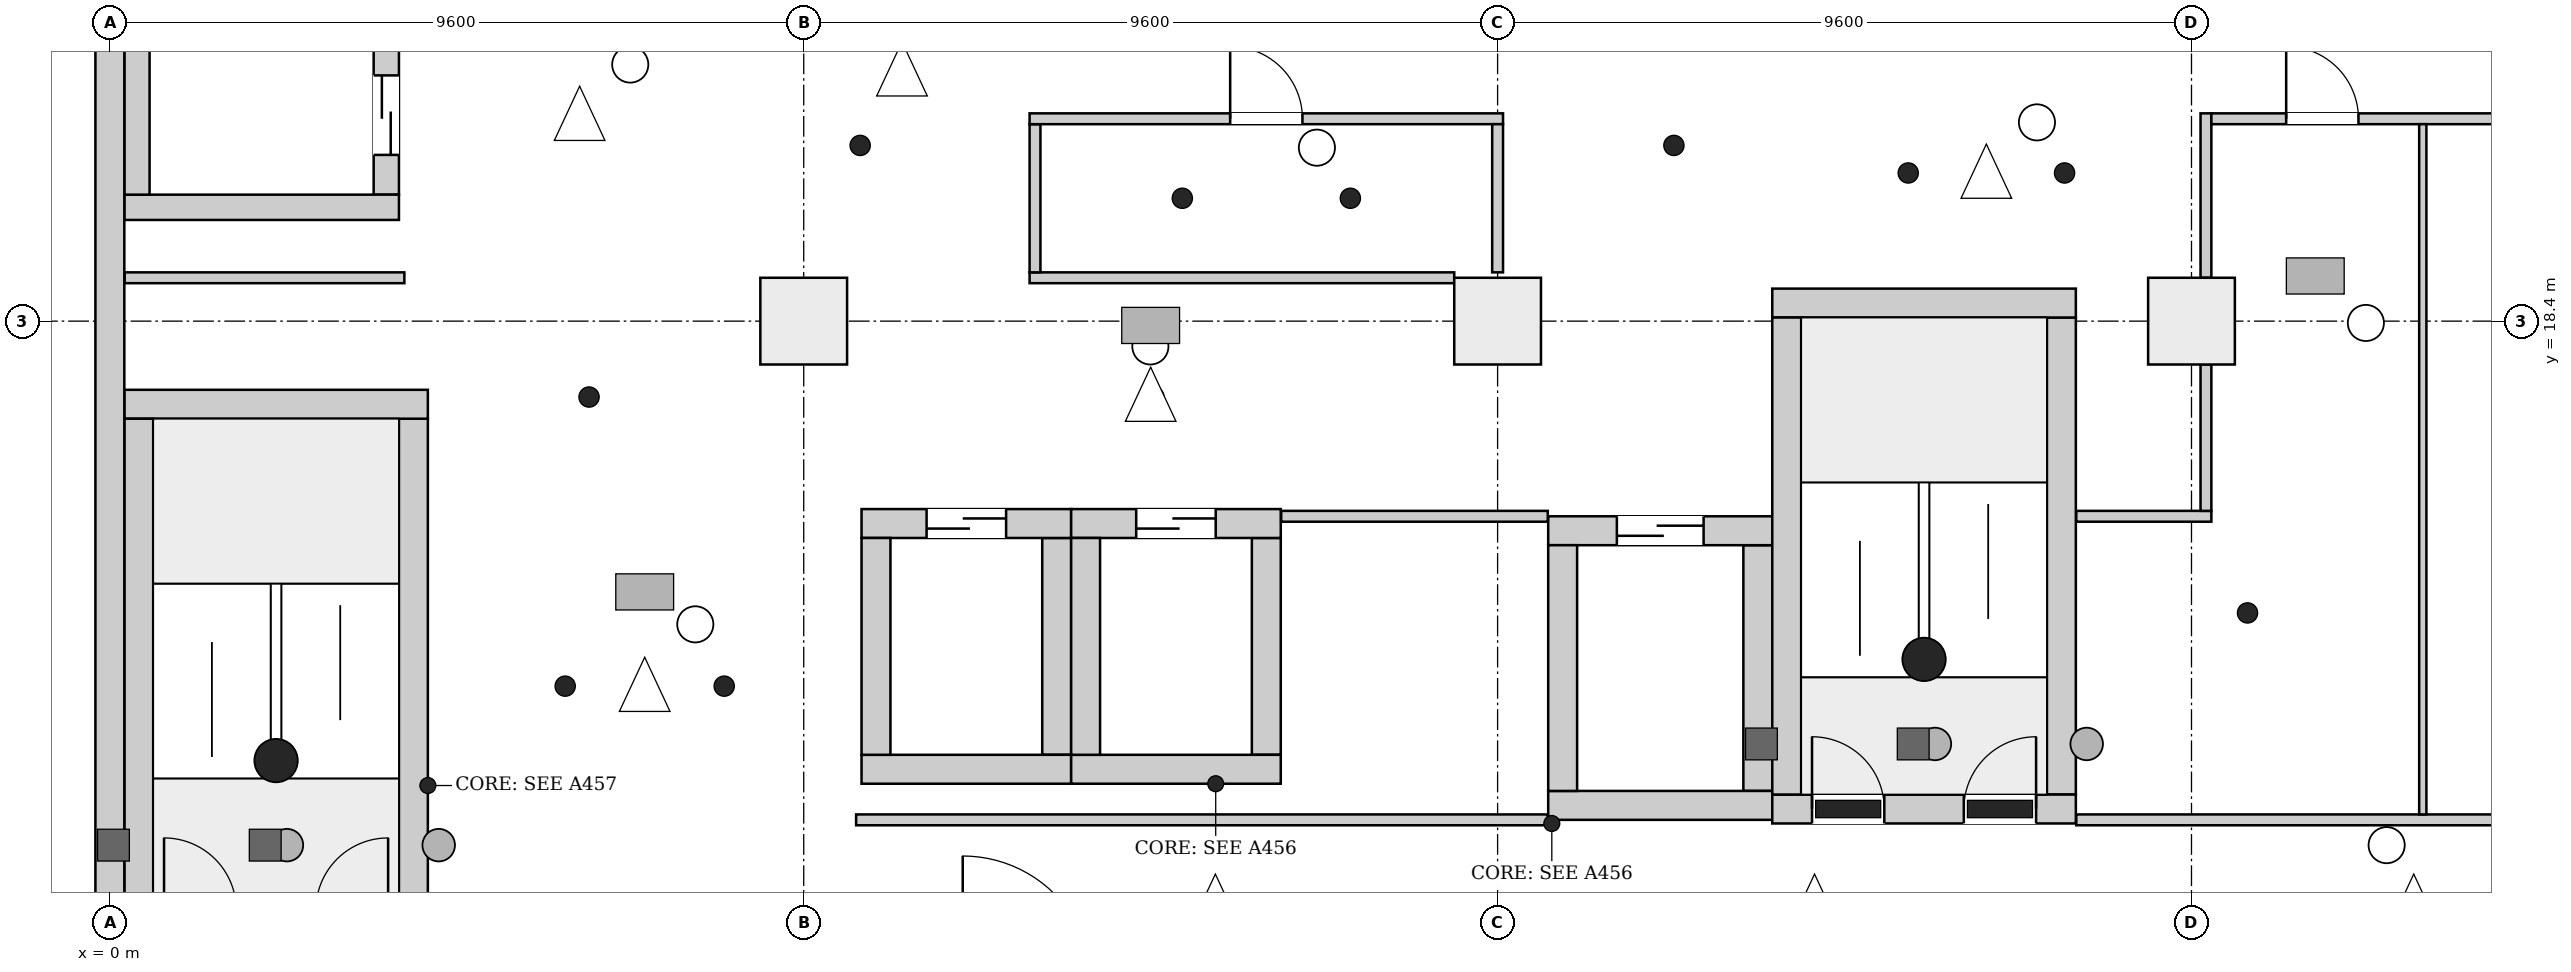
"""IFC4 building model, lengths in metres.
Left out: names, types, materials, properties, quantities, classifications, styles, units other than length and angle.
Written with IfcOpenShell. Run it as: python <this file> out.ifc"""

import sys

from ifc_helpers import new_model, si_unit, direction, frame, frame_2d, origin, origin_2d, place, context, subcontext, project, spatial, rectangle, extrude, element, fill, save


model = new_model("IFC4")
c1 = context("Model", 3, precision=1e-05, world=origin(), true_north=direction((0.0, 1.0)))
c2 = subcontext(c1, "Body", "Model", "MODEL_VIEW")
j1 = project(units=[si_unit("LENGTHUNIT", "METRE"), si_unit("PLANEANGLEUNIT", "RADIAN")], contexts=[c1])
p1 = place(None, origin())
s1 = spatial("IfcSite", under=j1, at=p1, CompositionType="ELEMENT")
p2 = place(p1, origin())
s2 = spatial("IfcBuilding", under=s1, at=p2, CompositionType="ELEMENT")
p3 = place(p2, frame((0.0, 0.0, 21.7)))
s3 = spatial("IfcBuildingStorey", under=s2, at=p3, CompositionType="ELEMENT", Elevation=21.7)
p4 = place(p3, frame((0.0, -0.2, 0.0), z_axis=(0.0, 0.0, 1.0), x_axis=(0.0, 1.0, 0.0)))
e1 = element("IfcWall", 1, at=p4, inside=s3, PredefinedType="SHEAR", context=c2, shape_type="SweptSolid", body=[
    extrude(rectangle(XDim=46.88, YDim=0.4, at=frame_2d((23.44, 0.0))), origin(), (0.0, 0.0, 1.0), 5.0),
])
p5 = place(p3, frame((0.2, 17.25, 0.0), z_axis=(0.0, 0.0, 1.0), x_axis=(1.0, 0.0, 0.0)))
e2 = element("IfcWall", 2, at=p5, inside=s3, PredefinedType="SHEAR", context=c2, shape_type="SweptSolid", body=[
    extrude(rectangle(XDim=4.2, YDim=0.4, at=frame_2d((2.1, 0.0))), origin(), (0.0, 0.0, 1.0), 5.0),
])
for number, where, z_axis, x_axis in (
    (3, (0.4, 10.45, 0.0), (0.0, 0.0, 1.0), (0.0, 1.0, 0.0)),
    (4, (4.2, 10.45, 0.0), (0.0, 0.0, 1.0), (0.0, 1.0, 0.0)),
):
    element("IfcWall", number, at=place(p3, frame(where, z_axis=z_axis, x_axis=x_axis)), inside=s3, PredefinedType="SHEAR", context=c2, shape_type="SweptSolid", body=[
        extrude(rectangle(XDim=6.6, YDim=0.4, at=frame_2d((3.3, 0.0))), origin(), (0.0, 0.0, 1.0), 5.0),
    ])
p6 = place(p3, frame((23.0, 11.65, 0.0), z_axis=(0.0, 0.0, 1.0), x_axis=(1.0, 0.0, 0.0)))
e5 = element("IfcWall", 5, at=p6, inside=s3, PredefinedType="SHEAR", context=c2, shape_type="SweptSolid", body=[
    extrude(rectangle(XDim=4.2, YDim=0.4, at=frame_2d((2.1, 0.0))), origin(), (0.0, 0.0, 1.0), 5.0),
])
p7 = place(p6, frame((0.55, 0.0, 0.0)))
e6 = element("IfcOpeningElement", 6, at=p7, cuts=e5, PredefinedType="OPENING", context=c2, shape_type="SweptSolid", body=[
    extrude(rectangle(XDim=1.0, YDim=2.1, at=frame_2d((0.5, 1.05))), frame((0.0, 0.21, 0.0), z_axis=(0.0, -1.0, 0.0), x_axis=(1.0, 0.0, 0.0)), (0.0, 0.0, 1.0), 0.42),
])
p8 = place(p6, frame((2.65, 0.0, 0.0)))
e7 = element("IfcOpeningElement", 7, at=p8, cuts=e5, PredefinedType="OPENING", context=c2, shape_type="SweptSolid", body=[
    extrude(rectangle(XDim=1.0, YDim=2.1, at=frame_2d((0.5, 1.05))), frame((0.0, 0.21, 0.0), z_axis=(0.0, -1.0, 0.0), x_axis=(1.0, 0.0, 0.0)), (0.0, 0.0, 1.0), 0.42),
])
p9 = place(p3, frame((23.0, 18.65, 0.0), z_axis=(0.0, 0.0, 1.0), x_axis=(1.0, 0.0, 0.0)))
e8 = element("IfcWall", 8, at=p9, inside=s3, PredefinedType="SHEAR", context=c2, shape_type="SweptSolid", body=[
    extrude(rectangle(XDim=4.2, YDim=0.4, at=frame_2d((2.1, 0.0))), origin(), (0.0, 0.0, 1.0), 5.0),
])
for number, where, z_axis, x_axis in (
    (9, (23.2, 11.85, 0.0), (0.0, 0.0, 1.0), (0.0, 1.0, 0.0)),
    (10, (27.0, 11.85, 0.0), (0.0, 0.0, 1.0), (0.0, 1.0, 0.0)),
):
    element("IfcWall", number, at=place(p3, frame(where, z_axis=z_axis, x_axis=x_axis)), inside=s3, PredefinedType="SHEAR", context=c2, shape_type="SweptSolid", body=[
        extrude(rectangle(XDim=6.6, YDim=0.4, at=frame_2d((3.3, 0.0))), origin(), (0.0, 0.0, 1.0), 5.0),
    ])
p10 = place(p3, frame((0.2, 19.975, 0.0), z_axis=(0.0, 0.0, 1.0), x_axis=(1.0, 0.0, 0.0)))
e11 = element("IfcWall", 11, at=p10, inside=s3, PredefinedType="SHEAR", context=c2, shape_type="SweptSolid", body=[
    extrude(rectangle(XDim=3.8, YDim=0.35, at=frame_2d((1.9, 0.0))), origin(), (0.0, 0.0, 1.0), 5.0),
])
p11 = place(p3, frame((0.375, 20.15, 0.0), z_axis=(0.0, 0.0, 1.0), x_axis=(0.0, 1.0, 0.0)))
e12 = element("IfcWall", 12, at=p11, inside=s3, PredefinedType="SHEAR", context=c2, shape_type="SweptSolid", body=[
    extrude(rectangle(XDim=2.2, YDim=0.35, at=frame_2d((1.1, 0.0))), origin(), (0.0, 0.0, 1.0), 5.0),
])
p12 = place(p3, frame((3.825, 20.15, 0.0), z_axis=(0.0, 0.0, 1.0), x_axis=(0.0, 1.0, 0.0)))
e13 = element("IfcWall", 13, at=p12, inside=s3, PredefinedType="SHEAR", context=c2, shape_type="SweptSolid", body=[
    extrude(rectangle(XDim=2.2, YDim=0.35, at=frame_2d((1.1, 0.0))), origin(), (0.0, 0.0, 1.0), 5.0),
])
p13 = place(p12, frame((0.55, 0.0, 0.0)))
e14 = element("IfcOpeningElement", 14, at=p13, cuts=e13, PredefinedType="OPENING", context=c2, shape_type="SweptSolid", body=[
    extrude(rectangle(XDim=1.1, YDim=2.1, at=frame_2d((0.55, 1.05))), frame((0.0, 0.185, 0.0), z_axis=(0.0, -1.0, 0.0), x_axis=(1.0, 0.0, 0.0)), (0.0, 0.0, 1.0), 0.37),
])
p14 = place(p3, frame((10.4, 12.2, 0.0), z_axis=(0.0, 0.0, 1.0), x_axis=(1.0, 0.0, 0.0)))
e15 = element("IfcWall", 15, at=p14, inside=s3, PredefinedType="SHEAR", context=c2, shape_type="SweptSolid", body=[
    extrude(rectangle(XDim=2.9, YDim=0.4, at=frame_2d((1.45, 0.0))), origin(), (0.0, 0.0, 1.0), 5.0),
])
p15 = place(p3, frame((10.4, 15.6, 0.0), z_axis=(0.0, 0.0, 1.0), x_axis=(1.0, 0.0, 0.0)))
e16 = element("IfcWall", 16, at=p15, inside=s3, PredefinedType="SHEAR", context=c2, shape_type="SweptSolid", body=[
    extrude(rectangle(XDim=2.9, YDim=0.4, at=frame_2d((1.45, 0.0))), origin(), (0.0, 0.0, 1.0), 5.0),
])
p16 = place(p15, frame((0.9, 0.0, 0.0)))
e17 = element("IfcOpeningElement", 17, at=p16, cuts=e16, PredefinedType="OPENING", context=c2, shape_type="SweptSolid", body=[
    extrude(rectangle(XDim=1.1, YDim=2.1, at=frame_2d((0.55, 1.05))), frame((0.0, 0.21, 0.0), z_axis=(0.0, -1.0, 0.0), x_axis=(1.0, 0.0, 0.0)), (0.0, 0.0, 1.0), 0.42),
])
for number, where, z_axis, x_axis in (
    (18, (10.6, 12.4, 0.0), (0.0, 0.0, 1.0), (0.0, 1.0, 0.0)),
    (19, (13.1, 12.4, 0.0), (0.0, 0.0, 1.0), (0.0, 1.0, 0.0)),
):
    element("IfcWall", number, at=place(p3, frame(where, z_axis=z_axis, x_axis=x_axis)), inside=s3, PredefinedType="SHEAR", context=c2, shape_type="SweptSolid", body=[
        extrude(rectangle(XDim=3.0, YDim=0.4, at=frame_2d((1.5, 0.0))), origin(), (0.0, 0.0, 1.0), 5.0),
    ])
p17 = place(p3, frame((13.3, 12.2, 0.0), z_axis=(0.0, 0.0, 1.0), x_axis=(1.0, 0.0, 0.0)))
e20 = element("IfcWall", 20, at=p17, inside=s3, PredefinedType="SHEAR", context=c2, shape_type="SweptSolid", body=[
    extrude(rectangle(XDim=2.9, YDim=0.4, at=frame_2d((1.45, 0.0))), origin(), (0.0, 0.0, 1.0), 5.0),
])
p18 = place(p3, frame((13.3, 15.6, 0.0), z_axis=(0.0, 0.0, 1.0), x_axis=(1.0, 0.0, 0.0)))
e21 = element("IfcWall", 21, at=p18, inside=s3, PredefinedType="SHEAR", context=c2, shape_type="SweptSolid", body=[
    extrude(rectangle(XDim=2.9, YDim=0.4, at=frame_2d((1.45, 0.0))), origin(), (0.0, 0.0, 1.0), 5.0),
])
p19 = place(p18, frame((0.9, 0.0, 0.0)))
e22 = element("IfcOpeningElement", 22, at=p19, cuts=e21, PredefinedType="OPENING", context=c2, shape_type="SweptSolid", body=[
    extrude(rectangle(XDim=1.1, YDim=2.1, at=frame_2d((0.55, 1.05))), frame((0.0, 0.21, 0.0), z_axis=(0.0, -1.0, 0.0), x_axis=(1.0, 0.0, 0.0)), (0.0, 0.0, 1.0), 0.42),
])
for number, where, z_axis, x_axis in (
    (23, (13.5, 12.4, 0.0), (0.0, 0.0, 1.0), (0.0, 1.0, 0.0)),
    (24, (16.0, 12.4, 0.0), (0.0, 0.0, 1.0), (0.0, 1.0, 0.0)),
):
    element("IfcWall", number, at=place(p3, frame(where, z_axis=z_axis, x_axis=x_axis)), inside=s3, PredefinedType="SHEAR", context=c2, shape_type="SweptSolid", body=[
        extrude(rectangle(XDim=3.0, YDim=0.4, at=frame_2d((1.5, 0.0))), origin(), (0.0, 0.0, 1.0), 5.0),
    ])
p20 = place(p3, frame((19.9, 11.7, 0.0), z_axis=(0.0, 0.0, 1.0), x_axis=(1.0, 0.0, 0.0)))
e25 = element("IfcWall", 25, at=p20, inside=s3, PredefinedType="SHEAR", context=c2, shape_type="SweptSolid", body=[
    extrude(rectangle(XDim=3.1, YDim=0.4, at=frame_2d((1.55, 0.0))), origin(), (0.0, 0.0, 1.0), 5.0),
])
p21 = place(p3, frame((19.9, 15.5, 0.0), z_axis=(0.0, 0.0, 1.0), x_axis=(1.0, 0.0, 0.0)))
e26 = element("IfcWall", 26, at=p21, inside=s3, PredefinedType="SHEAR", context=c2, shape_type="SweptSolid", body=[
    extrude(rectangle(XDim=3.1, YDim=0.4, at=frame_2d((1.55, 0.0))), origin(), (0.0, 0.0, 1.0), 5.0),
])
p22 = place(p21, frame((0.95, 0.0, 0.0)))
e27 = element("IfcOpeningElement", 27, at=p22, cuts=e26, PredefinedType="OPENING", context=c2, shape_type="SweptSolid", body=[
    extrude(rectangle(XDim=1.2, YDim=2.1, at=frame_2d((0.6, 1.05))), frame((0.0, 0.21, 0.0), z_axis=(0.0, -1.0, 0.0), x_axis=(1.0, 0.0, 0.0)), (0.0, 0.0, 1.0), 0.42),
])
for number, where, z_axis, x_axis in (
    (28, (20.1, 11.9, 0.0), (0.0, 0.0, 1.0), (0.0, 1.0, 0.0)),
    (29, (22.8, 11.9, 0.0), (0.0, 0.0, 1.0), (0.0, 1.0, 0.0)),
):
    element("IfcWall", number, at=place(p3, frame(where, z_axis=z_axis, x_axis=x_axis)), inside=s3, PredefinedType="SHEAR", context=c2, shape_type="SweptSolid", body=[
        extrude(rectangle(XDim=3.4, YDim=0.4, at=frame_2d((1.7, 0.0))), origin(), (0.0, 0.0, 1.0), 5.0),
    ])
for number, where, z_axis, x_axis in (
    (30, (9.6, 18.4, 0.0), (0.0, 0.0, 1.0), (1.0, 0.0, 0.0)),
    (31, (19.2, 18.4, 0.0), (0.0, 0.0, 1.0), (1.0, 0.0, 0.0)),
    (32, (28.8, 18.4, 0.0), (0.0, 0.0, 1.0), (1.0, 0.0, 0.0)),
):
    element("IfcColumn", number, at=place(p3, frame(where, z_axis=z_axis, x_axis=x_axis)), inside=s3, PredefinedType="COLUMN", context=c2, shape_type="SweptSolid", body=[
        extrude(rectangle(XDim=1.2, YDim=1.2, at=origin_2d()), origin(), (0.0, 0.0, 1.0), 5.0),
    ])
p23 = place(p3, frame((0.206, 19.0, 0.0), z_axis=(0.0, 0.0, 1.0), x_axis=(1.0, 0.0, 0.0)))
e33 = element("IfcWall", 33, at=p23, inside=s3, PredefinedType="PARTITIONING", context=c2, shape_type="SweptSolid", body=[
    extrude(rectangle(XDim=3.869, YDim=0.15, at=frame_2d((1.935, 0.0))), origin(), (0.0, 0.0, 1.0), 4.65),
])
p24 = place(p3, frame((10.325, 11.5, 0.0), z_axis=(0.0, 0.0, 1.0), x_axis=(1.0, 0.0, 0.0)))
e34 = element("IfcWall", 34, at=p24, inside=s3, PredefinedType="PARTITIONING", context=c2, shape_type="SweptSolid", body=[
    extrude(rectangle(XDim=9.569, YDim=0.15, at=frame_2d((4.785, 0.0))), origin(), (0.0, 0.0, 1.0), 4.65),
])
p25 = place(p3, frame((12.725, 19.0, 0.0), z_axis=(0.0, 0.0, 1.0), x_axis=(1.0, 0.0, 0.0)))
e35 = element("IfcWall", 35, at=p25, inside=s3, PredefinedType="PARTITIONING", context=c2, shape_type="SweptSolid", body=[
    extrude(rectangle(XDim=5.875, YDim=0.15, at=frame_2d((2.938, 0.0))), origin(), (0.0, 0.0, 1.0), 4.65),
])
p26 = place(p3, frame((12.8, 19.075, 0.0), z_axis=(0.0, 0.0, 1.0), x_axis=(0.0, 1.0, 0.0)))
e36 = element("IfcWall", 36, at=p26, inside=s3, PredefinedType="PARTITIONING", context=c2, shape_type="SweptSolid", body=[
    extrude(rectangle(XDim=2.05, YDim=0.15, at=frame_2d((1.025, 0.0))), origin(), (0.0, 0.0, 1.0), 4.65),
])
p27 = place(p3, frame((12.725, 21.2, 0.0), z_axis=(0.0, 0.0, 1.0), x_axis=(1.0, 0.0, 0.0)))
e37 = element("IfcWall", 37, at=p27, inside=s3, PredefinedType="PARTITIONING", context=c2, shape_type="SweptSolid", body=[
    extrude(rectangle(XDim=6.55, YDim=0.15, at=frame_2d((3.275, 0.0))), origin(), (0.0, 0.0, 1.0), 4.65),
])
p28 = place(p27, frame((2.775, 0.0, 0.0)))
e38 = element("IfcOpeningElement", 38, at=p28, cuts=e37, PredefinedType="OPENING", context=c2, shape_type="SweptSolid", body=[
    extrude(rectangle(XDim=1.0, YDim=2.1, at=frame_2d((0.5, 1.05))), frame((0.0, 0.085, 0.0), z_axis=(0.0, -1.0, 0.0), x_axis=(1.0, 0.0, 0.0)), (0.0, 0.0, 1.0), 0.17),
])
p29 = place(p3, frame((16.206, 15.7, 0.0), z_axis=(0.0, 0.0, 1.0), x_axis=(1.0, 0.0, 0.0)))
e39 = element("IfcWall", 39, at=p29, inside=s3, PredefinedType="PARTITIONING", context=c2, shape_type="SweptSolid", body=[
    extrude(rectangle(XDim=3.688, YDim=0.15, at=frame_2d((1.844, 0.0))), origin(), (0.0, 0.0, 1.0), 4.65),
])
p30 = place(p3, frame((19.2, 19.075, 0.0), z_axis=(0.0, 0.0, 1.0), x_axis=(0.0, 1.0, 0.0)))
e40 = element("IfcWall", 40, at=p30, inside=s3, PredefinedType="PARTITIONING", context=c2, shape_type="SweptSolid", body=[
    extrude(rectangle(XDim=2.05, YDim=0.15, at=frame_2d((1.025, 0.0))), origin(), (0.0, 0.0, 1.0), 4.25),
])
p31 = place(p3, frame((27.206, 11.5, 0.0), z_axis=(0.0, 0.0, 1.0), x_axis=(1.0, 0.0, 0.0)))
e41 = element("IfcWall", 41, at=p31, inside=s3, PredefinedType="PARTITIONING", context=c2, shape_type="SweptSolid", body=[
    extrude(rectangle(XDim=24.069, YDim=0.15, at=frame_2d((12.034, 0.0))), origin(), (0.0, 0.0, 1.0), 4.65),
])
p32 = place(p31, frame((13.894, 0.0, 0.0)))
e42 = element("IfcOpeningElement", 42, at=p32, cuts=e41, PredefinedType="OPENING", context=c2, shape_type="SweptSolid", body=[
    extrude(rectangle(XDim=1.0, YDim=2.1, at=frame_2d((0.5, 1.05))), frame((0.0, 0.085, 0.0), z_axis=(0.0, -1.0, 0.0), x_axis=(1.0, 0.0, 0.0)), (0.0, 0.0, 1.0), 0.17),
])
p33 = place(p31, frame((20.259, 0.0, 0.0)))
e43 = element("IfcOpeningElement", 43, at=p33, cuts=e41, PredefinedType="OPENING", context=c2, shape_type="SweptSolid", body=[
    extrude(rectangle(XDim=1.0, YDim=2.1, at=frame_2d((0.5, 1.05))), frame((0.0, 0.085, 0.0), z_axis=(0.0, -1.0, 0.0), x_axis=(1.0, 0.0, 0.0)), (0.0, 0.0, 1.0), 0.17),
])
p34 = place(p3, frame((27.206, 15.7, 0.0), z_axis=(0.0, 0.0, 1.0), x_axis=(1.0, 0.0, 0.0)))
e44 = element("IfcWall", 44, at=p34, inside=s3, PredefinedType="PARTITIONING", context=c2, shape_type="SweptSolid", body=[
    extrude(rectangle(XDim=1.869, YDim=0.15, at=frame_2d((0.935, 0.0))), origin(), (0.0, 0.0, 1.0), 4.65),
])
p35 = place(p3, frame((29.0, 15.775, 0.0), z_axis=(0.0, 0.0, 1.0), x_axis=(0.0, 1.0, 0.0)))
e45 = element("IfcWall", 45, at=p35, inside=s3, PredefinedType="PARTITIONING", context=c2, shape_type="SweptSolid", body=[
    extrude(rectangle(XDim=2.025, YDim=0.15, at=frame_2d((1.013, 0.0))), origin(), (0.0, 0.0, 1.0), 4.25),
])
p36 = place(p3, frame((29.0, 19.0, 0.0), z_axis=(0.0, 0.0, 1.0), x_axis=(0.0, 1.0, 0.0)))
e46 = element("IfcWall", 46, at=p36, inside=s3, PredefinedType="PARTITIONING", context=c2, shape_type="SweptSolid", body=[
    extrude(rectangle(XDim=2.275, YDim=0.15, at=frame_2d((1.137, 0.0))), origin(), (0.0, 0.0, 1.0), 4.25),
])
p37 = place(p3, frame((29.075, 21.2, 0.0), z_axis=(0.0, 0.0, 1.0), x_axis=(1.0, 0.0, 0.0)))
e47 = element("IfcWall", 47, at=p37, inside=s3, PredefinedType="PARTITIONING", context=c2, shape_type="SweptSolid", body=[
    extrude(rectangle(XDim=10.25, YDim=0.15, at=frame_2d((5.125, 0.0))), origin(), (0.0, 0.0, 1.0), 4.65),
])
p38 = place(p37, frame((1.035, 0.0, 0.0)))
e48 = element("IfcOpeningElement", 48, at=p38, cuts=e47, PredefinedType="OPENING", context=c2, shape_type="SweptSolid", body=[
    extrude(rectangle(XDim=1.0, YDim=2.1, at=frame_2d((0.5, 1.05))), frame((0.0, 0.085, 0.0), z_axis=(0.0, -1.0, 0.0), x_axis=(1.0, 0.0, 0.0)), (0.0, 0.0, 1.0), 0.17),
])
p39 = place(p37, frame((5.625, 0.0, 0.0)))
e49 = element("IfcOpeningElement", 49, at=p39, cuts=e47, PredefinedType="OPENING", context=c2, shape_type="SweptSolid", body=[
    extrude(rectangle(XDim=1.0, YDim=2.1, at=frame_2d((0.5, 1.05))), frame((0.0, 0.085, 0.0), z_axis=(0.0, -1.0, 0.0), x_axis=(1.0, 0.0, 0.0)), (0.0, 0.0, 1.0), 0.17),
])
p40 = place(p3, frame((32.0, 11.575, 0.0), z_axis=(0.0, 0.0, 1.0), x_axis=(0.0, 1.0, 0.0)))
e50 = element("IfcWall", 50, at=p40, inside=s3, PredefinedType="PARTITIONING", context=c2, shape_type="SweptSolid", body=[
    extrude(rectangle(XDim=9.55, YDim=0.1, at=frame_2d((4.775, 0.0))), origin(), (0.0, 0.0, 1.0), 4.65),
])
p41 = place(p7, origin())
e51 = element("IfcDoor", 51, at=p41, inside=s3, OperationType="SINGLE_SWING_RIGHT", PredefinedType="DOOR", context=c2, shape_type="SweptSolid", body=[
    extrude(rectangle(XDim=1.0, YDim=2.1, at=frame_2d((0.5, 1.05))), frame((0.0, 0.025, 0.0), z_axis=(0.0, -1.0, 0.0), x_axis=(1.0, 0.0, 0.0)), (0.0, 0.0, 1.0), 0.05),
])
fill(e6, e51)
p42 = place(p8, origin())
e52 = element("IfcDoor", 52, at=p42, inside=s3, OperationType="SINGLE_SWING_LEFT", PredefinedType="DOOR", context=c2, shape_type="SweptSolid", body=[
    extrude(rectangle(XDim=1.0, YDim=2.1, at=frame_2d((0.5, 1.05))), frame((0.0, 0.025, 0.0), z_axis=(0.0, -1.0, 0.0), x_axis=(1.0, 0.0, 0.0)), (0.0, 0.0, 1.0), 0.05),
])
fill(e7, e52)
p43 = place(p13, origin())
e53 = element("IfcDoor", 53, at=p43, inside=s3, OperationType="DOUBLE_DOOR_SLIDING", PredefinedType="DOOR", context=c2, shape_type="SweptSolid", body=[
    extrude(rectangle(XDim=1.1, YDim=2.1, at=frame_2d((0.55, 1.05))), frame((0.0, 0.025, 0.0), z_axis=(0.0, -1.0, 0.0), x_axis=(1.0, 0.0, 0.0)), (0.0, 0.0, 1.0), 0.05),
])
fill(e14, e53)
p44 = place(p16, origin())
e54 = element("IfcDoor", 54, at=p44, inside=s3, OperationType="DOUBLE_DOOR_SLIDING", PredefinedType="DOOR", context=c2, shape_type="SweptSolid", body=[
    extrude(rectangle(XDim=1.1, YDim=2.1, at=frame_2d((0.55, 1.05))), frame((0.0, 0.025, 0.0), z_axis=(0.0, -1.0, 0.0), x_axis=(1.0, 0.0, 0.0)), (0.0, 0.0, 1.0), 0.05),
])
fill(e17, e54)
p45 = place(p19, origin())
e55 = element("IfcDoor", 55, at=p45, inside=s3, OperationType="DOUBLE_DOOR_SLIDING", PredefinedType="DOOR", context=c2, shape_type="SweptSolid", body=[
    extrude(rectangle(XDim=1.1, YDim=2.1, at=frame_2d((0.55, 1.05))), frame((0.0, 0.025, 0.0), z_axis=(0.0, -1.0, 0.0), x_axis=(1.0, 0.0, 0.0)), (0.0, 0.0, 1.0), 0.05),
])
fill(e22, e55)
p46 = place(p22, origin())
e56 = element("IfcDoor", 56, at=p46, inside=s3, OperationType="DOUBLE_DOOR_SLIDING", PredefinedType="DOOR", context=c2, shape_type="SweptSolid", body=[
    extrude(rectangle(XDim=1.2, YDim=2.1, at=frame_2d((0.6, 1.05))), frame((0.0, 0.025, 0.0), z_axis=(0.0, -1.0, 0.0), x_axis=(1.0, 0.0, 0.0)), (0.0, 0.0, 1.0), 0.05),
])
fill(e27, e56)
p47 = place(p28, origin())
e57 = element("IfcDoor", 57, at=p47, inside=s3, OperationType="SINGLE_SWING_RIGHT", PredefinedType="DOOR", context=c2, shape_type="SweptSolid", body=[
    extrude(rectangle(XDim=1.0, YDim=2.1, at=frame_2d((0.5, 1.05))), frame((0.0, 0.025, 0.0), z_axis=(0.0, -1.0, 0.0), x_axis=(1.0, 0.0, 0.0)), (0.0, 0.0, 1.0), 0.05),
])
fill(e38, e57)
p48 = place(p38, origin())
e58 = element("IfcDoor", 58, at=p48, inside=s3, OperationType="SINGLE_SWING_RIGHT", PredefinedType="DOOR", context=c2, shape_type="SweptSolid", body=[
    extrude(rectangle(XDim=1.0, YDim=2.1, at=frame_2d((0.5, 1.05))), frame((0.0, 0.025, 0.0), z_axis=(0.0, -1.0, 0.0), x_axis=(1.0, 0.0, 0.0)), (0.0, 0.0, 1.0), 0.05),
])
fill(e48, e58)
save(model, sys.argv[1])
